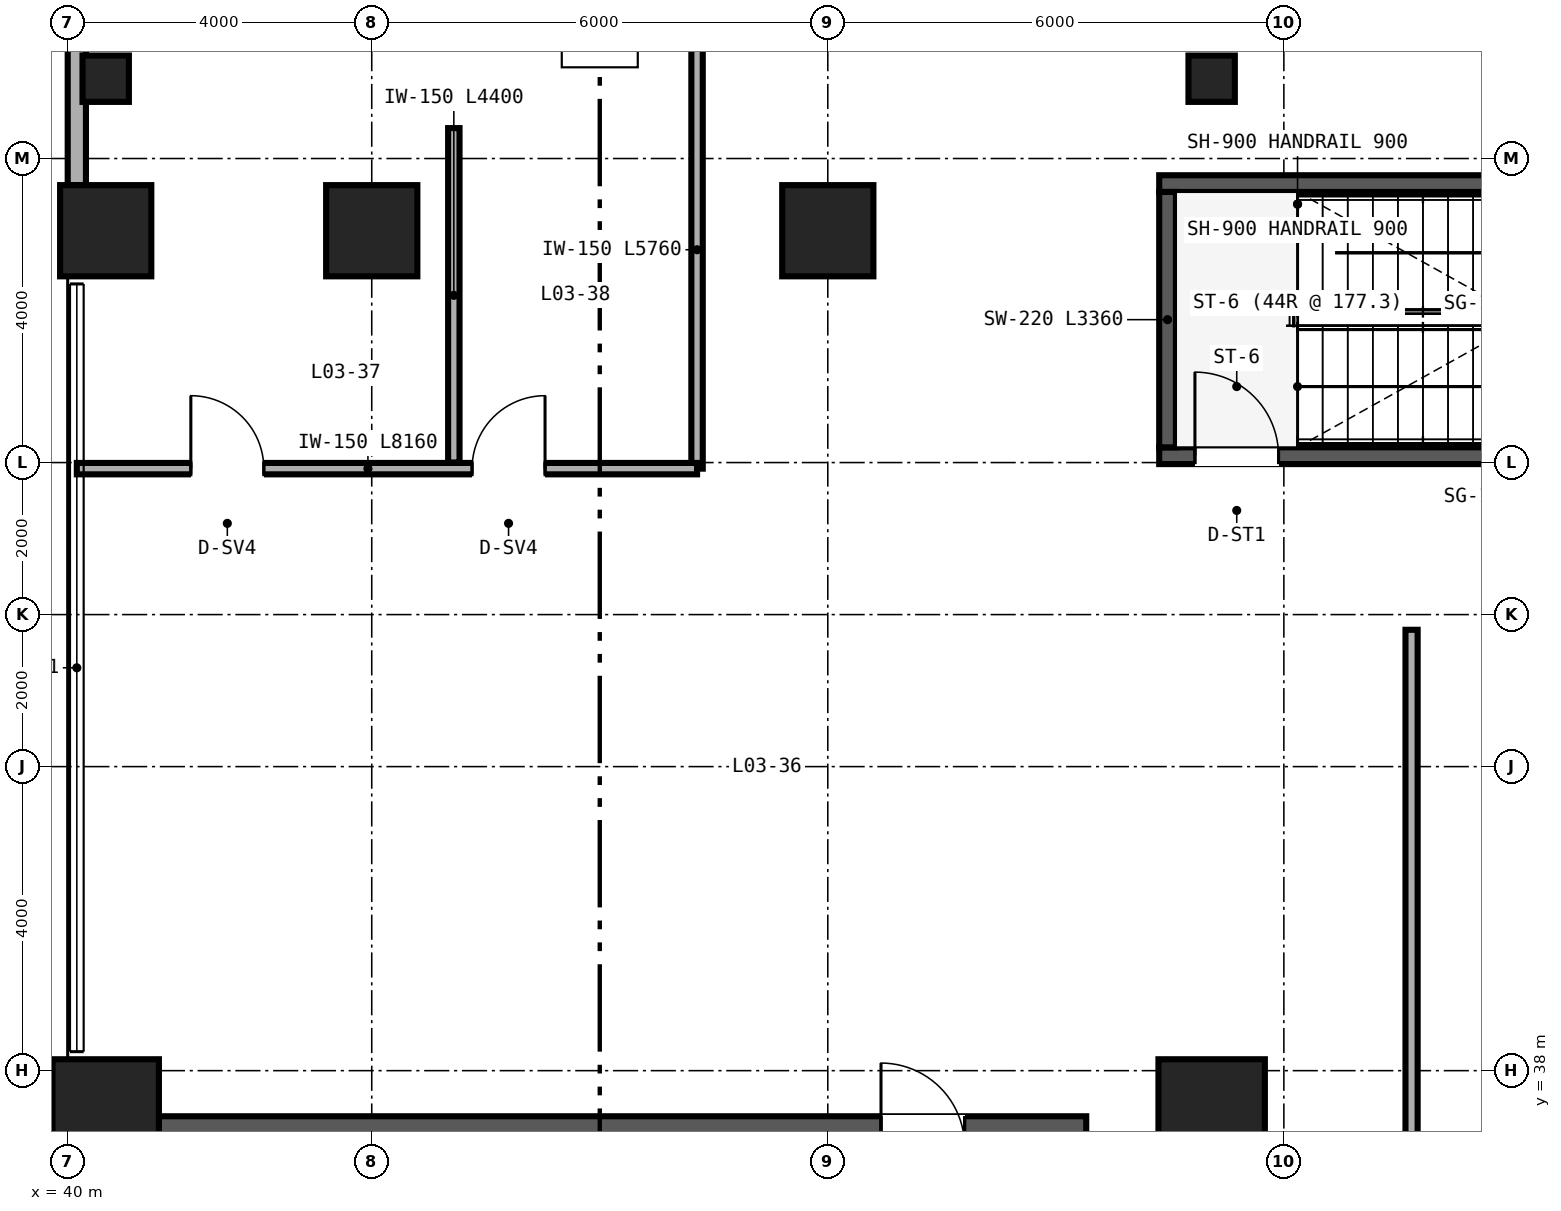
"""IFC4 building model, lengths in metres.
Left out: names, types, materials, properties, quantities, classifications, styles, units other than length and angle.
Written with IfcOpenShell. Run it as: python <this file> out.ifc"""

import sys

from ifc_helpers import new_model, si_unit, direction, frame, frame_2d, origin, origin_2d, place, context, subcontext, project, spatial, rectangle, hollow_circle, extrude, source, transform, mapped, element, fill, save


model = new_model("IFC4")
c1 = context("Model", 3, precision=1e-05, world=origin(), true_north=direction((0.0, 1.0)))
c2 = subcontext(c1, "Body", "Model", "MODEL_VIEW")
j1 = project(units=[si_unit("LENGTHUNIT", "METRE"), si_unit("PLANEANGLEUNIT", "RADIAN")], contexts=[c1])
p1 = place(None, origin())
s1 = spatial("IfcSite", under=j1, at=p1, CompositionType="ELEMENT")
p2 = place(p1, origin())
s2 = spatial("IfcBuilding", under=s1, at=p2, CompositionType="ELEMENT")
p3 = place(p2, frame((0.0, 0.0, 11.4)))
s3 = spatial("IfcBuildingStorey", under=s2, at=p3, CompositionType="ELEMENT", Elevation=11.4)
p4 = place(p3, frame((40.6, 37.0, 0.0), z_axis=(0.0, 0.0, 1.0), x_axis=(1.0, 0.0, 0.0)))
e1 = element("IfcWall", 1, at=p4, inside=s3, PredefinedType="SHEAR", context=c2, shape_type="SweptSolid", body=[
    extrude(rectangle(XDim=12.8, YDim=0.8, at=frame_2d((6.4, 0.0))), origin(), (0.0, 0.0, 1.0), 7.51),
])
p5 = place(p4, frame((10.1, 0.0, 0.0)))
e2 = element("IfcOpeningElement", 2, at=p5, cuts=e1, PredefinedType="OPENING", context=c2, shape_type="SweptSolid", body=[
    extrude(rectangle(XDim=1.1, YDim=2.15, at=frame_2d((0.55, 1.075))), frame((0.0, 0.41, 0.0), z_axis=(0.0, -1.0, 0.0), x_axis=(1.0, 0.0, 0.0)), (0.0, 0.0, 1.0), 0.82),
])
p6 = place(p3, frame((54.36, 46.09, 0.0), z_axis=(0.0, 0.0, 1.0), x_axis=(1.0, 0.0, 0.0)))
e3 = element("IfcWall", 3, at=p6, inside=s3, PredefinedType="SHEAR", context=c2, shape_type="SweptSolid", body=[
    extrude(rectangle(XDim=8.06, YDim=0.22, at=frame_2d((4.03, 0.0))), origin(), (0.0, 0.0, 1.0), 7.6),
])
p7 = place(p6, frame((0.47, 0.0, 0.0)))
e4 = element("IfcOpeningElement", 4, at=p7, cuts=e3, PredefinedType="OPENING", context=c2, shape_type="SweptSolid", body=[
    extrude(rectangle(XDim=1.1, YDim=2.15, at=frame_2d((0.55, 1.075))), frame((0.0, 0.12, 0.0), z_axis=(0.0, -1.0, 0.0), x_axis=(1.0, 0.0, 0.0)), (0.0, 0.0, 1.0), 0.24),
])
p8 = place(p3, frame((54.36, 49.67, 0.0), z_axis=(0.0, 0.0, 1.0), x_axis=(1.0, 0.0, 0.0)))
e5 = element("IfcWall", 5, at=p8, inside=s3, PredefinedType="SHEAR", context=c2, shape_type="SweptSolid", body=[
    extrude(rectangle(XDim=8.06, YDim=0.22, at=frame_2d((4.03, 0.0))), origin(), (0.0, 0.0, 1.0), 7.6),
])
p9 = place(p3, frame((54.47, 46.2, 0.0), z_axis=(0.0, 0.0, 1.0), x_axis=(0.0, 1.0, 0.0)))
e6 = element("IfcWall", 6, at=p9, inside=s3, PredefinedType="SHEAR", context=c2, shape_type="SweptSolid", body=[
    extrude(rectangle(XDim=3.36, YDim=0.22, at=frame_2d((1.68, 0.0))), origin(), (0.0, 0.0, 1.0), 7.6),
])
m1 = source(origin(), c2, "Body", "SweptSolid", [
    extrude(hollow_circle(Radius=0.305, WallThickness=0.025, at=origin_2d()), origin(), (0.0, 0.0, 1.0), 7.51),
])
for number, where, z_axis, x_axis in (
    (7, (40.5, 51.05, 0.0), (0.0, 0.0, 1.0), (1.0, 0.0, 0.0)),
    (8, (55.05, 51.05, 0.0), (0.0, 0.0, 1.0), (1.0, 0.0, 0.0)),
):
    element("IfcColumn", number, at=place(p3, frame(where, z_axis=z_axis, x_axis=x_axis)), inside=s3, PredefinedType="COLUMN", context=c2, shape_type="MappedRepresentation", body=[
        mapped(m1, transform((0.0, 0.0, 0.0), scale=1.0)),
    ])
m2 = source(origin(), c2, "Body", "SweptSolid", [
    extrude(rectangle(XDim=1.4, YDim=1.4, at=origin_2d()), origin(), (0.0, 0.0, 1.0), 7.51),
])
for number, where, z_axis, x_axis in (
    (9, (40.5, 37.45, 0.0), (0.0, 0.0, 1.0), (1.0, 0.0, 0.0)),
    (10, (55.05, 37.45, 0.0), (0.0, 0.0, 1.0), (1.0, 0.0, 0.0)),
):
    element("IfcColumn", number, at=place(p3, frame(where, z_axis=z_axis, x_axis=x_axis)), inside=s3, PredefinedType="COLUMN", context=c2, shape_type="MappedRepresentation", body=[
        mapped(m2, transform((0.0, 0.0, 0.0), scale=1.0)),
    ])
m3 = source(origin(), c2, "Body", "SweptSolid", [
    extrude(rectangle(XDim=1.2, YDim=1.2, at=origin_2d()), origin(), (0.0, 0.0, 1.0), 7.51),
])
for number, where, z_axis, x_axis in (
    (11, (40.5, 49.05, 0.0), (0.0, 0.0, 1.0), (1.0, 0.0, 0.0)),
    (12, (44.0, 49.05, 0.0), (0.0, 0.0, 1.0), (1.0, 0.0, 0.0)),
    (13, (50.0, 49.05, 0.0), (0.0, 0.0, 1.0), (1.0, 0.0, 0.0)),
):
    element("IfcColumn", number, at=place(p3, frame(where, z_axis=z_axis, x_axis=x_axis)), inside=s3, PredefinedType="COLUMN", context=c2, shape_type="MappedRepresentation", body=[
        mapped(m3, transform((0.0, 0.0, 0.0), scale=1.0)),
    ])
p10 = place(p3, frame((40.12, 49.65, 0.0), z_axis=(0.0, 0.0, 1.0), x_axis=(0.0, 1.0, 0.0)))
e14 = element("IfcWall", 14, at=p10, inside=s3, PredefinedType="SOLIDWALL", context=c2, shape_type="SweptSolid", body=[
    extrude(rectangle(XDim=2.05, YDim=0.24, at=frame_2d((1.025, 0.0))), origin(), (0.0, 0.0, 1.0), 6.583),
])
p11 = place(p3, frame((45.08, 46.0, 0.0), z_axis=(0.0, 0.0, 1.0), x_axis=(0.0, 1.0, 0.0)))
e15 = element("IfcWall", 15, at=p11, inside=s3, PredefinedType="PARTITIONING", context=c2, shape_type="SweptSolid", body=[
    extrude(rectangle(XDim=4.4, YDim=0.15, at=frame_2d((2.2, 0.0))), origin(), (0.0, 0.0, 1.0), 6.817),
])
p12 = place(p3, frame((48.28, 45.92, 0.0), z_axis=(0.0, 0.0, 1.0), x_axis=(0.0, 1.0, 0.0)))
e16 = element("IfcWall", 16, at=p12, inside=s3, PredefinedType="PARTITIONING", context=c2, shape_type="SweptSolid", body=[
    extrude(rectangle(XDim=5.76, YDim=0.15, at=frame_2d((2.88, 0.0))), origin(), (0.0, 0.0, 1.0), 6.583),
])
p13 = place(p3, frame((40.12, 45.92, 0.0), z_axis=(0.0, 0.0, 1.0), x_axis=(1.0, 0.0, 0.0)))
e17 = element("IfcWall", 17, at=p13, inside=s3, PredefinedType="PARTITIONING", context=c2, shape_type="SweptSolid", body=[
    extrude(rectangle(XDim=8.16, YDim=0.15, at=frame_2d((4.08, 0.0))), origin(), (0.0, 0.0, 1.0), 6.731),
])
p14 = place(p13, frame((1.5, 0.0, 0.0)))
e18 = element("IfcOpeningElement", 18, at=p14, cuts=e17, PredefinedType="OPENING", context=c2, shape_type="SweptSolid", body=[
    extrude(rectangle(XDim=0.96, YDim=2.15, at=frame_2d((0.48, 1.075))), frame((0.0, 0.085, 0.0), z_axis=(0.0, -1.0, 0.0), x_axis=(1.0, 0.0, 0.0)), (0.0, 0.0, 1.0), 0.17),
])
p15 = place(p13, frame((5.2, 0.0, 0.0)))
e19 = element("IfcOpeningElement", 19, at=p15, cuts=e17, PredefinedType="OPENING", context=c2, shape_type="SweptSolid", body=[
    extrude(rectangle(XDim=0.96, YDim=2.15, at=frame_2d((0.48, 1.075))), frame((0.0, 0.085, 0.0), z_axis=(0.0, -1.0, 0.0), x_axis=(1.0, 0.0, 0.0)), (0.0, 0.0, 1.0), 0.17),
])
p16 = place(p3, frame((57.68, 12.6, 0.0), z_axis=(0.0, 0.0, 1.0), x_axis=(0.0, 1.0, 0.0)))
e20 = element("IfcWall", 20, at=p16, inside=s3, PredefinedType="PARTITIONING", context=c2, shape_type="SweptSolid", body=[
    extrude(rectangle(XDim=31.2, YDim=0.16, at=frame_2d((15.6, 0.0))), origin(), (0.0, 0.0, 1.0), 7.51),
])
p17 = place(p16, frame((4.0, 0.0, 0.0)))
e21 = element("IfcOpeningElement", 21, at=p17, cuts=e20, PredefinedType="OPENING", context=c2, shape_type="SweptSolid", body=[
    extrude(rectangle(XDim=1.1, YDim=2.15, at=frame_2d((0.55, 1.075))), frame((0.0, 0.09, 0.0), z_axis=(0.0, -1.0, 0.0), x_axis=(1.0, 0.0, 0.0)), (0.0, 0.0, 1.0), 0.18),
])
p18 = place(p16, frame((22.0, 0.0, 0.0)))
e22 = element("IfcOpeningElement", 22, at=p18, cuts=e20, PredefinedType="OPENING", context=c2, shape_type="SweptSolid", body=[
    extrude(rectangle(XDim=1.1, YDim=2.15, at=frame_2d((0.55, 1.075))), frame((0.0, 0.09, 0.0), z_axis=(0.0, -1.0, 0.0), x_axis=(1.0, 0.0, 0.0)), (0.0, 0.0, 1.0), 0.18),
])
m4 = source(origin(), c2, "Body", "SweptSolid", [
    extrude(rectangle(XDim=1.1, YDim=2.15, at=frame_2d((0.55, 1.075))), frame((0.0, 0.025, 0.0), z_axis=(0.0, -1.0, 0.0), x_axis=(1.0, 0.0, 0.0)), (0.0, 0.0, 1.0), 0.05),
])
p19 = place(p7, origin())
e23 = element("IfcDoor", 23, at=p19, inside=s3, OperationType="SINGLE_SWING_LEFT", PredefinedType="DOOR", context=c2, shape_type="MappedRepresentation", body=[
    mapped(m4, transform((0.0, 0.0, 0.0), scale=1.0)),
])
fill(e4, e23)
m5 = source(origin(), c2, "Body", "SweptSolid", [
    extrude(rectangle(XDim=0.96, YDim=2.15, at=frame_2d((0.48, 1.075))), frame((0.0, 0.025, 0.0), z_axis=(0.0, -1.0, 0.0), x_axis=(1.0, 0.0, 0.0)), (0.0, 0.0, 1.0), 0.05),
])
p20 = place(p14, origin())
e24 = element("IfcDoor", 24, at=p20, inside=s3, OperationType="SINGLE_SWING_LEFT", PredefinedType="DOOR", context=c2, shape_type="MappedRepresentation", body=[
    mapped(m5, transform((0.0, 0.0, 0.0), scale=1.0)),
])
fill(e18, e24)
p21 = place(p15, origin())
e25 = element("IfcDoor", 25, at=p21, inside=s3, OperationType="SINGLE_SWING_RIGHT", PredefinedType="DOOR", context=c2, shape_type="MappedRepresentation", body=[
    mapped(m5, transform((0.0, 0.0, 0.0), scale=1.0)),
])
fill(e19, e25)
save(model, sys.argv[1])
